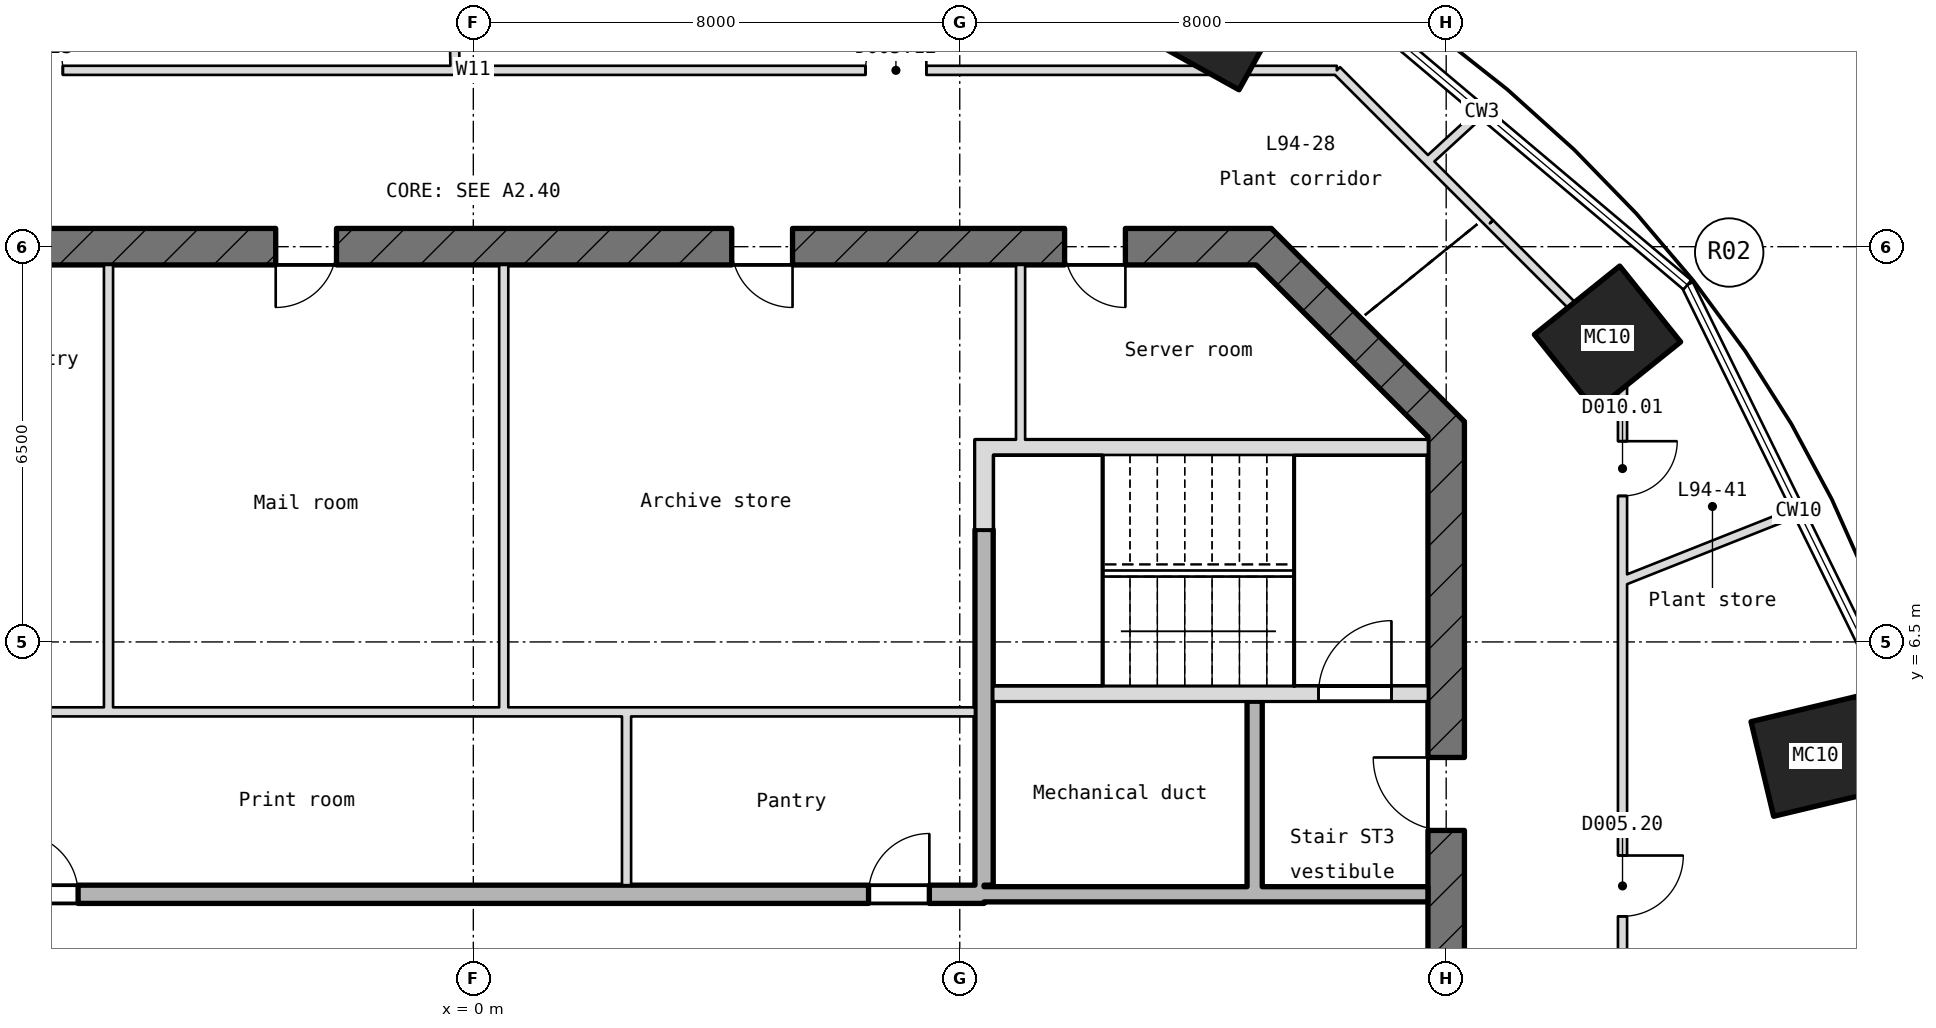
"""IFC4 building model, lengths in metres.
Left out: names, types, materials, properties, quantities, classifications, styles, units other than length and angle.
Written with IfcOpenShell. Run it as: python <this file> out.ifc"""

import sys

from ifc_helpers import new_model, si_unit, direction, frame, frame_2d, origin, origin_2d, place, context, subcontext, project, spatial, rectangle, hollow_rectangle, extrude, element, fill, save


model = new_model("IFC4")
c1 = context("Model", 3, precision=1e-05, world=origin(), true_north=direction((0.0, 1.0)))
c2 = subcontext(c1, "Body", "Model", "MODEL_VIEW")
j1 = project(units=[si_unit("LENGTHUNIT", "METRE"), si_unit("PLANEANGLEUNIT", "RADIAN")], contexts=[c1])
p1 = place(None, origin())
s1 = spatial("IfcSite", under=j1, at=p1, CompositionType="ELEMENT")
p2 = place(p1, origin())
s2 = spatial("IfcBuilding", under=s1, at=p2, CompositionType="ELEMENT")
p3 = place(p2, frame((0.0, 0.0, 418.55)))
s3 = spatial("IfcBuildingStorey", under=s2, at=p3, CompositionType="ELEMENT", Elevation=418.55)
for number, where, z_axis, x_axis in (
    (1, (22.075, 4.62, -0.2), (0.0, 0.0, 1.0), (0.232, -0.973, 0.0)),
    (2, (18.653, 11.494, -0.2), (0.0, 0.0, 1.0), (0.626, -0.78, 0.0)),
    (3, (12.331, 16.755, -0.2), (0.0, 0.0, 1.0), (0.874, -0.486, 0.0)),
):
    element("IfcColumn", number, at=place(p3, frame(where, z_axis=z_axis, x_axis=x_axis)), inside=s3, PredefinedType="COLUMN", context=c2, shape_type="SweptSolid", body=[
        extrude(hollow_rectangle(XDim=1.6, YDim=1.8, WallThickness=0.045, at=origin_2d()), origin(), (0.0, 0.0, 1.0), 4.9),
    ])
p4 = place(p3, frame((16.0, -10.124, -0.2), z_axis=(0.0, 0.0, 1.0), x_axis=(0.0, 1.0, 0.0)))
e4 = element("IfcWall", 4, at=p4, inside=s3, PredefinedType="SHEAR", context=c2, shape_type="SweptSolid", body=[
    extrude(rectangle(XDim=20.249, YDim=0.6, at=frame_2d((10.124, 0.0))), origin(), (0.0, 0.0, 1.0), 4.9),
])
p5 = place(p4, frame((8.924, 0.0, 0.2)))
e5 = element("IfcOpeningElement", 5, at=p5, cuts=e4, PredefinedType="OPENING", context=c2, shape_type="SweptSolid", body=[
    extrude(rectangle(XDim=2.4, YDim=2.1, at=frame_2d((1.2, 1.05))), frame((0.0, 0.31, 0.0), z_axis=(0.0, -1.0, 0.0), x_axis=(1.0, 0.0, 0.0)), (0.0, 0.0, 1.0), 0.62),
])
p6 = place(p4, frame((13.524, 0.0, 0.2)))
e6 = element("IfcOpeningElement", 6, at=p6, cuts=e4, PredefinedType="OPENING", context=c2, shape_type="SweptSolid", body=[
    extrude(rectangle(XDim=1.2, YDim=2.1, at=frame_2d((0.6, 1.05))), frame((0.0, 0.31, 0.0), z_axis=(0.0, -1.0, 0.0), x_axis=(1.0, 0.0, 0.0)), (0.0, 0.0, 1.0), 0.62),
])
p7 = place(p4, frame((2.4, 0.0, 0.2)))
e7 = element("IfcOpeningElement", 7, at=p7, cuts=e4, PredefinedType="OPENING", context=c2, shape_type="SweptSolid", body=[
    extrude(rectangle(XDim=1.2, YDim=2.1, at=frame_2d((0.6, 1.05))), frame((0.0, 0.31, 0.0), z_axis=(0.0, -1.0, 0.0), x_axis=(1.0, 0.0, 0.0)), (0.0, 0.0, 1.0), 0.62),
])
p8 = place(p3, frame((16.088, 9.912, -0.2), z_axis=(0.0, 0.0, 1.0), x_axis=(-0.707106781187, 0.707106781187, 0.0)))
e8 = element("IfcWall", 8, at=p8, inside=s3, PredefinedType="SHEAR", context=c2, shape_type="SweptSolid", body=[
    extrude(rectangle(XDim=4.491, YDim=0.6, at=frame_2d((2.246, 0.0))), origin(), (0.0, 0.0, 1.0), 4.9),
])
p9 = place(p3, frame((13.124, 13.0, -0.2), z_axis=(0.0, 0.0, 1.0), x_axis=(-1.0, 0.0, 0.0)))
e9 = element("IfcWall", 9, at=p9, inside=s3, PredefinedType="SHEAR", context=c2, shape_type="SweptSolid", body=[
    extrude(rectangle(XDim=26.249, YDim=0.6, at=frame_2d((13.124, 0.0))), origin(), (0.0, 0.0, 1.0), 4.9),
])
p10 = place(p9, frame((22.062, 0.0, 0.2)))
e10 = element("IfcOpeningElement", 10, at=p10, cuts=e9, PredefinedType="OPENING", context=c2, shape_type="SweptSolid", body=[
    extrude(rectangle(XDim=1.0, YDim=2.1, at=frame_2d((0.5, 1.05))), frame((0.0, 0.31, 0.0), z_axis=(0.0, -1.0, 0.0), x_axis=(1.0, 0.0, 0.0)), (0.0, 0.0, 1.0), 0.62),
])
p11 = place(p9, frame((15.374, 0.0, 0.2)))
e11 = element("IfcOpeningElement", 11, at=p11, cuts=e9, PredefinedType="OPENING", context=c2, shape_type="SweptSolid", body=[
    extrude(rectangle(XDim=1.0, YDim=2.1, at=frame_2d((0.5, 1.05))), frame((0.0, 0.31, 0.0), z_axis=(0.0, -1.0, 0.0), x_axis=(1.0, 0.0, 0.0)), (0.0, 0.0, 1.0), 0.62),
])
p12 = place(p9, frame((7.874, 0.0, 0.2)))
e12 = element("IfcOpeningElement", 12, at=p12, cuts=e9, PredefinedType="OPENING", context=c2, shape_type="SweptSolid", body=[
    extrude(rectangle(XDim=1.0, YDim=2.1, at=frame_2d((0.5, 1.05))), frame((0.0, 0.31, 0.0), z_axis=(0.0, -1.0, 0.0), x_axis=(1.0, 0.0, 0.0)), (0.0, 0.0, 1.0), 0.62),
])
p13 = place(p9, frame((2.4, 0.0, 0.2)))
e13 = element("IfcOpeningElement", 13, at=p13, cuts=e9, PredefinedType="OPENING", context=c2, shape_type="SweptSolid", body=[
    extrude(rectangle(XDim=1.0, YDim=2.1, at=frame_2d((0.5, 1.05))), frame((0.0, 0.31, 0.0), z_axis=(0.0, -1.0, 0.0), x_axis=(1.0, 0.0, 0.0)), (0.0, 0.0, 1.0), 0.62),
])
p14 = place(p3, frame((-8.4, 2.35, -0.2), z_axis=(0.0, 0.0, 1.0), x_axis=(1.0, 0.0, 0.0)))
e14 = element("IfcWall", 14, at=p14, inside=s3, PredefinedType="SHEAR", context=c2, shape_type="SweptSolid", body=[
    extrude(rectangle(XDim=16.8, YDim=0.3, at=frame_2d((8.4, 0.0))), origin(), (0.0, 0.0, 1.0), 4.9),
])
p15 = place(p14, frame((0.9, 0.0, 0.2)))
e15 = element("IfcOpeningElement", 15, at=p15, cuts=e14, PredefinedType="OPENING", context=c2, shape_type="SweptSolid", body=[
    extrude(rectangle(XDim=1.0, YDim=2.1, at=frame_2d((0.5, 1.05))), frame((0.0, 0.16, 0.0), z_axis=(0.0, -1.0, 0.0), x_axis=(1.0, 0.0, 0.0)), (0.0, 0.0, 1.0), 0.32),
])
p16 = place(p14, frame((14.9, 0.0, 0.2)))
e16 = element("IfcOpeningElement", 16, at=p16, cuts=e14, PredefinedType="OPENING", context=c2, shape_type="SweptSolid", body=[
    extrude(rectangle(XDim=1.0, YDim=2.1, at=frame_2d((0.5, 1.05))), frame((0.0, 0.16, 0.0), z_axis=(0.0, -1.0, 0.0), x_axis=(1.0, 0.0, 0.0)), (0.0, 0.0, 1.0), 0.32),
])
p17 = place(p3, frame((8.4, 2.35, 0.0), z_axis=(0.0, 0.0, 1.0), x_axis=(1.0, 0.0, 0.0)))
e17 = element("IfcWall", 17, at=p17, inside=s3, PredefinedType="STANDARD", context=c2, shape_type="SweptSolid", body=[
    extrude(rectangle(XDim=7.3, YDim=0.25, at=frame_2d((3.65, 0.0))), origin(), (0.0, 0.0, 1.0), 4.7),
])
p18 = place(p3, frame((-8.25, 5.35, 0.0), z_axis=(0.0, 0.0, 1.0), x_axis=(1.0, 0.0, 0.0)))
e18 = element("IfcWall", 18, at=p18, inside=s3, PredefinedType="PARTITIONING", context=c2, shape_type="SweptSolid", body=[
    extrude(rectangle(XDim=16.5, YDim=0.15, at=frame_2d((8.25, 0.0))), origin(), (0.0, 0.0, 1.0), 4.7),
])
p19 = place(p3, frame((8.55, 5.65, -0.2), z_axis=(0.0, 0.0, 1.0), x_axis=(1.0, 0.0, 0.0)))
e19 = element("IfcWall", 19, at=p19, inside=s3, PredefinedType="SHEAR", context=c2, shape_type="SweptSolid", body=[
    extrude(rectangle(XDim=7.15, YDim=0.25, at=frame_2d((3.575, 0.0))), origin(), (0.0, 0.0, 1.0), 4.9),
])
p20 = place(p19, frame((5.35, 0.0, 0.2)))
e20 = element("IfcOpeningElement", 20, at=p20, cuts=e19, PredefinedType="OPENING", context=c2, shape_type="SweptSolid", body=[
    extrude(rectangle(XDim=1.2, YDim=2.1, at=frame_2d((0.6, 1.05))), frame((0.0, 0.135, 0.0), z_axis=(0.0, -1.0, 0.0), x_axis=(1.0, 0.0, 0.0)), (0.0, 0.0, 1.0), 0.27),
])
p21 = place(p3, frame((8.55, 9.7, -0.2), z_axis=(0.0, 0.0, 1.0), x_axis=(1.0, 0.0, 0.0)))
e21 = element("IfcWall", 21, at=p21, inside=s3, PredefinedType="SHEAR", context=c2, shape_type="SweptSolid", body=[
    extrude(rectangle(XDim=7.15, YDim=0.25, at=frame_2d((3.575, 0.0))), origin(), (0.0, 0.0, 1.0), 4.9),
])
for number, where, z_axis, x_axis in (
    (22, (-6.0, 5.425, 0.0), (0.0, 0.0, 1.0), (0.0, 1.0, 0.0)),
    (23, (0.5, 5.425, 0.0), (0.0, 0.0, 1.0), (0.0, 1.0, 0.0)),
):
    element("IfcWall", number, at=place(p3, frame(where, z_axis=z_axis, x_axis=x_axis)), inside=s3, PredefinedType="PARTITIONING", context=c2, shape_type="SweptSolid", body=[
        extrude(rectangle(XDim=7.275, YDim=0.15, at=frame_2d((3.637, 0.0))), origin(), (0.0, 0.0, 1.0), 4.7),
    ])
p22 = place(p3, frame((2.52, 2.5, 0.0), z_axis=(0.0, 0.0, 1.0), x_axis=(0.0, 1.0, 0.0)))
e24 = element("IfcWall", 24, at=p22, inside=s3, PredefinedType="PARTITIONING", context=c2, shape_type="SweptSolid", body=[
    extrude(rectangle(XDim=2.775, YDim=0.15, at=frame_2d((1.387, 0.0))), origin(), (0.0, 0.0, 1.0), 4.7),
])
p23 = place(p3, frame((8.4, 2.5, -0.2), z_axis=(0.0, 0.0, 1.0), x_axis=(0.0, 1.0, 0.0)))
e25 = element("IfcWall", 25, at=p23, inside=s3, PredefinedType="SHEAR", context=c2, shape_type="SweptSolid", body=[
    extrude(rectangle(XDim=5.85, YDim=0.3, at=frame_2d((2.925, 0.0))), origin(), (0.0, 0.0, 1.0), 4.9),
])
p24 = place(p3, frame((8.4, 8.35, -0.2), z_axis=(0.0, 0.0, 1.0), x_axis=(0.0, 1.0, 0.0)))
e26 = element("IfcWall", 26, at=p24, inside=s3, PredefinedType="SHEAR", context=c2, shape_type="SweptSolid", body=[
    extrude(rectangle(XDim=1.475, YDim=0.3, at=frame_2d((0.737, 0.0))), origin(), (0.0, 0.0, 1.0), 4.9),
])
p25 = place(p3, frame((9.0, 9.825, 0.0), z_axis=(0.0, 0.0, 1.0), x_axis=(0.0, 1.0, 0.0)))
e27 = element("IfcWall", 27, at=p25, inside=s3, PredefinedType="PARTITIONING", context=c2, shape_type="SweptSolid", body=[
    extrude(rectangle(XDim=2.875, YDim=0.15, at=frame_2d((1.438, 0.0))), origin(), (0.0, 0.0, 1.0), 4.7),
])
p26 = place(p3, frame((12.85, 2.475, 0.0), z_axis=(0.0, 0.0, 1.0), x_axis=(0.0, 1.0, 0.0)))
e28 = element("IfcWall", 28, at=p26, inside=s3, PredefinedType="STANDARD", context=c2, shape_type="SweptSolid", body=[
    extrude(rectangle(XDim=3.05, YDim=0.25, at=frame_2d((1.525, 0.0))), origin(), (0.0, 0.0, 1.0), 4.7),
])
p27 = place(p3, frame((-14.201, 15.9, 0.0), z_axis=(0.0, 0.0, 1.0), x_axis=(1.0, 0.0, 0.0)))
e29 = element("IfcWall", 29, at=p27, inside=s3, PredefinedType="PARTITIONING", context=c2, shape_type="SweptSolid", body=[
    extrude(rectangle(XDim=28.403, YDim=0.15, at=frame_2d((14.201, 0.0))), origin(), (0.0, 0.0, 1.0), 4.7),
])
p28 = place(p27, frame((20.652, 0.0, 0.0)))
e30 = element("IfcOpeningElement", 30, at=p28, cuts=e29, PredefinedType="OPENING", context=c2, shape_type="SweptSolid", body=[
    extrude(rectangle(XDim=1.0, YDim=2.1, at=frame_2d((0.5, 1.05))), frame((0.0, 0.085, 0.0), z_axis=(0.0, -1.0, 0.0), x_axis=(1.0, 0.0, 0.0)), (0.0, 0.0, 1.0), 0.17),
])
p29 = place(p27, frame((6.45, 0.0, 0.0)))
e31 = element("IfcOpeningElement", 31, at=p29, cuts=e29, PredefinedType="OPENING", context=c2, shape_type="SweptSolid", body=[
    extrude(rectangle(XDim=1.0, YDim=2.1, at=frame_2d((0.5, 1.05))), frame((0.0, 0.085, 0.0), z_axis=(0.0, -1.0, 0.0), x_axis=(1.0, 0.0, 0.0)), (0.0, 0.0, 1.0), 0.17),
])
p30 = place(p3, frame((18.9, 7.501, 0.0), z_axis=(0.0, 0.0, 1.0), x_axis=(0.92946881875, 0.368900684428, 0.0)))
e32 = element("IfcWall", 32, at=p30, inside=s3, PredefinedType="PARTITIONING", context=c2, shape_type="SweptSolid", body=[
    extrude(rectangle(XDim=3.095, YDim=0.15, at=frame_2d((1.548, 0.0))), origin(), (0.0, 0.0, 1.0), 4.7),
])
p31 = place(p3, frame((15.698, 14.404, 0.0), z_axis=(0.0, 0.0, 1.0), x_axis=(0.736966436557, 0.67592933905, 0.0)))
e33 = element("IfcWall", 33, at=p31, inside=s3, PredefinedType="PARTITIONING", context=c2, shape_type="SweptSolid", body=[
    extrude(rectangle(XDim=1.188, YDim=0.15, at=frame_2d((0.594, 0.0))), origin(), (0.0, 0.0, 1.0), 4.7),
])
p32 = place(p3, frame((18.9, -11.201, 0.0), z_axis=(0.0, 0.0, 1.0), x_axis=(0.0, 1.0, 0.0)))
e34 = element("IfcWall", 34, at=p32, inside=s3, PredefinedType="PARTITIONING", context=c2, shape_type="SweptSolid", body=[
    extrude(rectangle(XDim=22.403, YDim=0.15, at=frame_2d((11.201, 0.0))), origin(), (0.0, 0.0, 1.0), 4.7),
])
p33 = place(p32, frame((3.838, 0.0, 0.0)))
e35 = element("IfcOpeningElement", 35, at=p33, cuts=e34, PredefinedType="OPENING", context=c2, shape_type="SweptSolid", body=[
    extrude(rectangle(XDim=1.0, YDim=2.1, at=frame_2d((0.5, 1.05))), frame((0.0, 0.085, 0.0), z_axis=(0.0, -1.0, 0.0), x_axis=(1.0, 0.0, 0.0)), (0.0, 0.0, 1.0), 0.17),
])
p34 = place(p32, frame((13.189, 0.0, 0.0)))
e36 = element("IfcOpeningElement", 36, at=p34, cuts=e34, PredefinedType="OPENING", context=c2, shape_type="SweptSolid", body=[
    extrude(rectangle(XDim=1.0, YDim=2.1, at=frame_2d((0.5, 1.05))), frame((0.0, 0.085, 0.0), z_axis=(0.0, -1.0, 0.0), x_axis=(1.0, 0.0, 0.0)), (0.0, 0.0, 1.0), 0.17),
])
p35 = place(p32, frame((20.102, 0.0, 0.0)))
e37 = element("IfcOpeningElement", 37, at=p35, cuts=e34, PredefinedType="OPENING", context=c2, shape_type="SweptSolid", body=[
    extrude(rectangle(XDim=0.9, YDim=2.1, at=frame_2d((0.45, 1.05))), frame((0.0, 0.085, 0.0), z_axis=(0.0, -1.0, 0.0), x_axis=(1.0, 0.0, 0.0)), (0.0, 0.0, 1.0), 0.17),
])
p36 = place(p3, frame((-0.301, 15.9, 0.0), z_axis=(0.0, 0.0, 1.0), x_axis=(-0.018863287148, 0.99982207237, 0.0)))
e38 = element("IfcWall", 38, at=p36, inside=s3, PredefinedType="PARTITIONING", context=c2, shape_type="SweptSolid", body=[
    extrude(rectangle(XDim=3.598, YDim=0.15, at=frame_2d((1.799, 0.0))), origin(), (0.0, 0.0, 1.0), 4.347),
])
p37 = place(p3, frame((18.9, 11.201, 0.0), z_axis=(0.0, 0.0, 1.0), x_axis=(-0.707283756971, 0.706929761097, 0.0)))
e39 = element("IfcWall", 39, at=p37, inside=s3, PredefinedType="PARTITIONING", context=c2, shape_type="SweptSolid", body=[
    extrude(rectangle(XDim=0.69, YDim=0.15, at=frame_2d((0.345, 0.0))), origin(), (0.0, 0.0, 1.0), 4.7),
])
p38 = place(p3, frame((18.412, 11.689, 0.0), z_axis=(0.0, 0.0, 1.0), x_axis=(-0.707055846068, 0.707157712636, 0.0)))
e40 = element("IfcWall", 40, at=p38, inside=s3, PredefinedType="PARTITIONING", context=c2, shape_type="SweptSolid", body=[
    extrude(rectangle(XDim=2.397, YDim=0.15, at=frame_2d((1.198, 0.0))), origin(), (0.0, 0.0, 1.0), 4.238),
])
p39 = place(p3, frame((16.718, 13.384, 0.0), z_axis=(0.0, 0.0, 1.0), x_axis=(-0.707072476431, 0.707141084278, 0.0)))
e41 = element("IfcWall", 41, at=p39, inside=s3, PredefinedType="PARTITIONING", context=c2, shape_type="SweptSolid", body=[
    extrude(rectangle(XDim=3.559, YDim=0.15, at=frame_2d((1.779, 0.0))), origin(), (0.0, 0.0, 1.0), 4.7),
])
p40 = place(p20, origin())
e42 = element("IfcDoor", 42, at=p40, inside=s3, OperationType="SINGLE_SWING_RIGHT", PredefinedType="DOOR", context=c2, shape_type="SweptSolid", body=[
    extrude(rectangle(XDim=1.2, YDim=2.1, at=frame_2d((0.6, 1.05))), frame((0.0, 0.025, 0.0), z_axis=(0.0, -1.0, 0.0), x_axis=(1.0, 0.0, 0.0)), (0.0, 0.0, 1.0), 0.05),
])
fill(e20, e42)
p41 = place(p6, origin())
e43 = element("IfcDoor", 43, at=p41, inside=s3, OperationType="SINGLE_SWING_RIGHT", PredefinedType="DOOR", context=c2, shape_type="SweptSolid", body=[
    extrude(rectangle(XDim=1.2, YDim=2.1, at=frame_2d((0.6, 1.05))), frame((0.0, 0.025, 0.0), z_axis=(0.0, -1.0, 0.0), x_axis=(1.0, 0.0, 0.0)), (0.0, 0.0, 1.0), 0.05),
])
fill(e6, e43)
p42 = place(p15, origin())
e44 = element("IfcDoor", 44, at=p42, inside=s3, OperationType="SINGLE_SWING_RIGHT", PredefinedType="DOOR", context=c2, shape_type="SweptSolid", body=[
    extrude(rectangle(XDim=1.0, YDim=2.1, at=frame_2d((0.5, 1.05))), frame((0.0, 0.025, 0.0), z_axis=(0.0, -1.0, 0.0), x_axis=(1.0, 0.0, 0.0)), (0.0, 0.0, 1.0), 0.05),
])
fill(e15, e44)
p43 = place(p16, origin())
e45 = element("IfcDoor", 45, at=p43, inside=s3, OperationType="SINGLE_SWING_RIGHT", PredefinedType="DOOR", context=c2, shape_type="SweptSolid", body=[
    extrude(rectangle(XDim=1.0, YDim=2.1, at=frame_2d((0.5, 1.05))), frame((0.0, 0.025, 0.0), z_axis=(0.0, -1.0, 0.0), x_axis=(1.0, 0.0, 0.0)), (0.0, 0.0, 1.0), 0.05),
])
fill(e16, e45)
p44 = place(p11, origin())
e46 = element("IfcDoor", 46, at=p44, inside=s3, OperationType="SINGLE_SWING_RIGHT", PredefinedType="DOOR", context=c2, shape_type="SweptSolid", body=[
    extrude(rectangle(XDim=1.0, YDim=2.1, at=frame_2d((0.5, 1.05))), frame((0.0, 0.025, 0.0), z_axis=(0.0, -1.0, 0.0), x_axis=(1.0, 0.0, 0.0)), (0.0, 0.0, 1.0), 0.05),
])
fill(e11, e46)
p45 = place(p12, origin())
e47 = element("IfcDoor", 47, at=p45, inside=s3, OperationType="SINGLE_SWING_RIGHT", PredefinedType="DOOR", context=c2, shape_type="SweptSolid", body=[
    extrude(rectangle(XDim=1.0, YDim=2.1, at=frame_2d((0.5, 1.05))), frame((0.0, 0.025, 0.0), z_axis=(0.0, -1.0, 0.0), x_axis=(1.0, 0.0, 0.0)), (0.0, 0.0, 1.0), 0.05),
])
fill(e12, e47)
p46 = place(p13, origin())
e48 = element("IfcDoor", 48, at=p46, inside=s3, OperationType="SINGLE_SWING_RIGHT", PredefinedType="DOOR", context=c2, shape_type="SweptSolid", body=[
    extrude(rectangle(XDim=1.0, YDim=2.1, at=frame_2d((0.5, 1.05))), frame((0.0, 0.025, 0.0), z_axis=(0.0, -1.0, 0.0), x_axis=(1.0, 0.0, 0.0)), (0.0, 0.0, 1.0), 0.05),
])
fill(e13, e48)
p47 = place(p28, origin())
e49 = element("IfcDoor", 49, at=p47, inside=s3, OperationType="SINGLE_SWING_RIGHT", PredefinedType="DOOR", context=c2, shape_type="SweptSolid", body=[
    extrude(rectangle(XDim=1.0, YDim=2.1, at=frame_2d((0.5, 1.05))), frame((0.0, 0.025, 0.0), z_axis=(0.0, -1.0, 0.0), x_axis=(1.0, 0.0, 0.0)), (0.0, 0.0, 1.0), 0.05),
])
fill(e30, e49)
p48 = place(p29, origin())
e50 = element("IfcDoor", 50, at=p48, inside=s3, OperationType="SINGLE_SWING_RIGHT", PredefinedType="DOOR", context=c2, shape_type="SweptSolid", body=[
    extrude(rectangle(XDim=1.0, YDim=2.1, at=frame_2d((0.5, 1.05))), frame((0.0, 0.025, 0.0), z_axis=(0.0, -1.0, 0.0), x_axis=(1.0, 0.0, 0.0)), (0.0, 0.0, 1.0), 0.05),
])
fill(e31, e50)
p49 = place(p34, frame((1.0, 0.0, 0.0), z_axis=(0.0, 0.0, 1.0), x_axis=(-1.0, 0.0, 0.0)))
e51 = element("IfcDoor", 51, at=p49, inside=s3, OperationType="SINGLE_SWING_LEFT", PredefinedType="DOOR", context=c2, shape_type="SweptSolid", body=[
    extrude(rectangle(XDim=1.0, YDim=2.1, at=frame_2d((0.5, 1.05))), frame((0.0, 0.025, 0.0), z_axis=(0.0, -1.0, 0.0), x_axis=(1.0, 0.0, 0.0)), (0.0, 0.0, 1.0), 0.05),
])
fill(e36, e51)
p50 = place(p35, frame((0.9, 0.0, 0.0), z_axis=(0.0, 0.0, 1.0), x_axis=(-1.0, 0.0, 0.0)))
e52 = element("IfcDoor", 52, at=p50, inside=s3, OperationType="SINGLE_SWING_LEFT", PredefinedType="DOOR", context=c2, shape_type="SweptSolid", body=[
    extrude(rectangle(XDim=0.9, YDim=2.1, at=frame_2d((0.45, 1.05))), frame((0.0, 0.025, 0.0), z_axis=(0.0, -1.0, 0.0), x_axis=(1.0, 0.0, 0.0)), (0.0, 0.0, 1.0), 0.05),
])
fill(e37, e52)
save(model, sys.argv[1])
